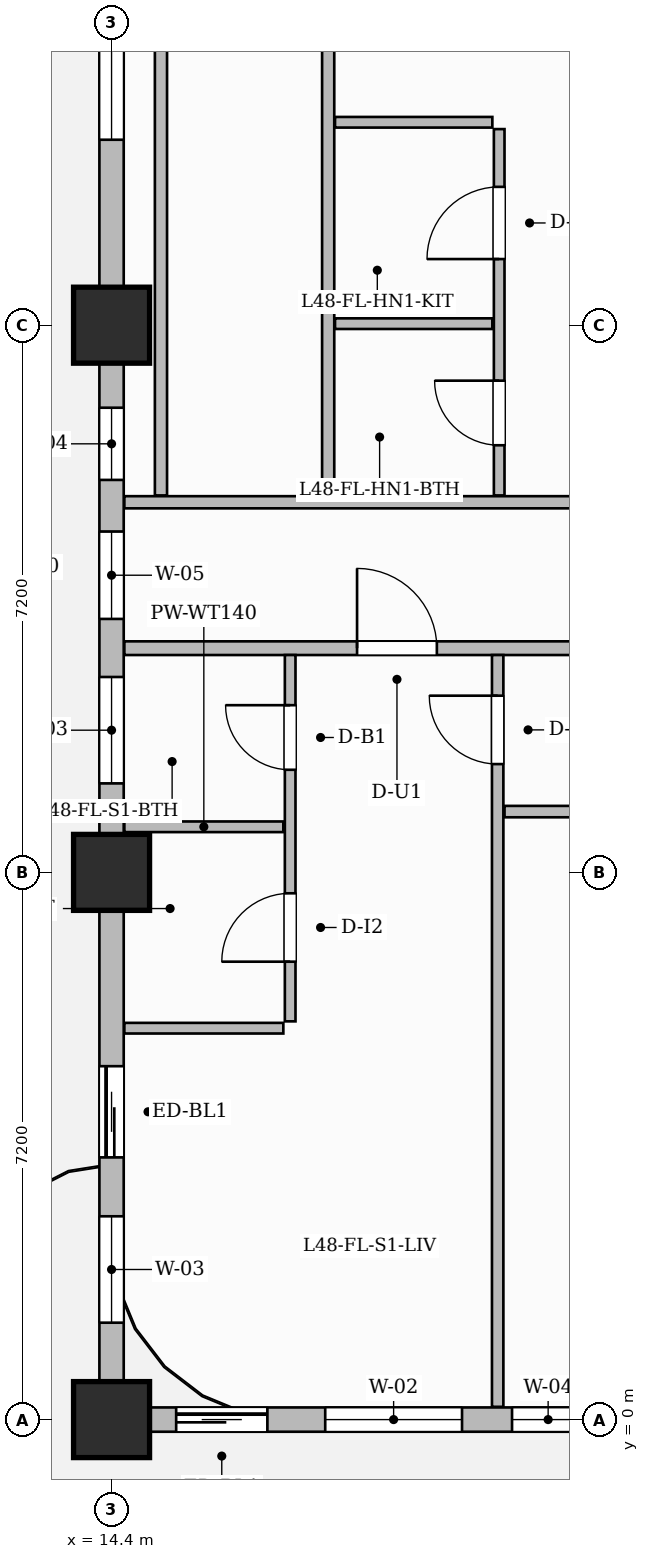
"""IFC4 building model, lengths in metres.
Left out: names, types, materials, properties, quantities, classifications, styles, units other than length and angle.
Written with IfcOpenShell. Run it as: python <this file> out.ifc"""

import sys

from ifc_helpers import new_model, si_unit, direction, frame, frame_2d, origin, origin_2d, place, context, subcontext, project, spatial, rectangle, extrude, source, transform, mapped, element, fill, save


model = new_model("IFC4")
c1 = context("Model", 3, precision=1e-05, world=origin(), true_north=direction((0.0, 1.0)))
c2 = subcontext(c1, "Body", "Model", "MODEL_VIEW")
j1 = project(units=[si_unit("LENGTHUNIT", "METRE"), si_unit("PLANEANGLEUNIT", "RADIAN")], contexts=[c1])
p1 = place(None, origin())
s1 = spatial("IfcSite", under=j1, at=p1, CompositionType="ELEMENT")
p2 = place(p1, origin())
s2 = spatial("IfcBuilding", under=s1, at=p2, CompositionType="ELEMENT")
p3 = place(p2, frame((0.0, 0.0, 192.65)))
s3 = spatial("IfcBuildingStorey", under=s2, at=p3, CompositionType="ELEMENT", Elevation=192.65)
m1 = source(origin(), c2, "Body", "SweptSolid", [
    extrude(rectangle(XDim=1.0, YDim=1.0, at=origin_2d()), origin(), (0.0, 0.0, 1.0), 3.85),
])
for number, where, z_axis, x_axis in (
    (1, (14.4, 0.0, 0.0), (0.0, 0.0, 1.0), (1.0, 0.0, 0.0)),
    (2, (14.4, 7.2, 0.0), (0.0, 0.0, 1.0), (1.0, 0.0, 0.0)),
    (3, (14.4, 14.4, 0.0), (0.0, 0.0, 1.0), (1.0, 0.0, 0.0)),
):
    element("IfcColumn", number, at=place(p3, frame(where, z_axis=z_axis, x_axis=x_axis)), inside=s3, PredefinedType="COLUMN", context=c2, shape_type="MappedRepresentation", body=[
        mapped(m1, transform((0.0, 0.0, 0.0), scale=1.0)),
    ])
p4 = place(p3, frame((14.568, 10.15, 0.0), z_axis=(0.0, 0.0, 1.0), x_axis=(1.0, 0.0, 0.0)))
e4 = element("IfcWall", 4, at=p4, inside=s3, PredefinedType="PARTITIONING", context=c2, shape_type="SweptSolid", body=[
    extrude(rectangle(XDim=15.542, YDim=0.18, at=frame_2d((7.771, 0.0))), origin(), (0.0, 0.0, 1.0), 3.55),
])
p5 = place(p4, frame((3.062, 0.0, 0.0)))
e5 = element("IfcOpeningElement", 5, at=p5, cuts=e4, PredefinedType="OPENING", context=c2, shape_type="SweptSolid", body=[
    extrude(rectangle(XDim=1.05, YDim=2.25, at=frame_2d((0.525, 1.125))), frame((0.0, 0.1, 0.0), z_axis=(0.0, -1.0, 0.0), x_axis=(1.0, 0.0, 0.0)), (0.0, 0.0, 1.0), 0.2),
])
p6 = place(p4, frame((12.632, 0.0, 0.0)))
e6 = element("IfcOpeningElement", 6, at=p6, cuts=e4, PredefinedType="OPENING", context=c2, shape_type="SweptSolid", body=[
    extrude(rectangle(XDim=1.4, YDim=2.35, at=frame_2d((0.7, 1.175))), frame((0.0, 0.1, 0.0), z_axis=(0.0, -1.0, 0.0), x_axis=(1.0, 0.0, 0.0)), (0.0, 0.0, 1.0), 0.2),
])
p7 = place(p3, frame((14.568, 12.07, 0.0), z_axis=(0.0, 0.0, 1.0), x_axis=(1.0, 0.0, 0.0)))
e7 = element("IfcWall", 7, at=p7, inside=s3, PredefinedType="PARTITIONING", context=c2, shape_type="SweptSolid", body=[
    extrude(rectangle(XDim=15.542, YDim=0.16, at=frame_2d((7.771, 0.0))), origin(), (0.0, 0.0, 1.0), 3.55),
])
p8 = place(p7, frame((6.557, 0.0, 0.0)))
e8 = element("IfcOpeningElement", 8, at=p8, cuts=e7, PredefinedType="OPENING", context=c2, shape_type="SweptSolid", body=[
    extrude(rectangle(XDim=1.05, YDim=2.25, at=frame_2d((0.525, 1.125))), frame((0.0, 0.09, 0.0), z_axis=(0.0, -1.0, 0.0), x_axis=(1.0, 0.0, 0.0)), (0.0, 0.0, 1.0), 0.18),
])
p9 = place(p3, frame((16.75, 5.24, 0.0), z_axis=(0.0, 0.0, 1.0), x_axis=(0.0, 1.0, 0.0)))
e9 = element("IfcWall", 9, at=p9, inside=s3, PredefinedType="PARTITIONING", context=c2, shape_type="SweptSolid", body=[
    extrude(rectangle(XDim=4.82, YDim=0.14, at=frame_2d((2.41, 0.0))), origin(), (0.0, 0.0, 1.0), 3.55),
])
p10 = place(p9, frame((0.785, 0.0, 0.0)))
e10 = element("IfcOpeningElement", 10, at=p10, cuts=e9, PredefinedType="OPENING", context=c2, shape_type="SweptSolid", body=[
    extrude(rectangle(XDim=0.9, YDim=2.15, at=frame_2d((0.45, 1.075))), frame((0.0, 0.08, 0.0), z_axis=(0.0, -1.0, 0.0), x_axis=(1.0, 0.0, 0.0)), (0.0, 0.0, 1.0), 0.16),
])
p11 = place(p9, frame((3.31, 0.0, 0.0)))
e11 = element("IfcOpeningElement", 11, at=p11, cuts=e9, PredefinedType="OPENING", context=c2, shape_type="SweptSolid", body=[
    extrude(rectangle(XDim=0.85, YDim=2.1, at=frame_2d((0.425, 1.05))), frame((0.0, 0.08, 0.0), z_axis=(0.0, -1.0, 0.0), x_axis=(1.0, 0.0, 0.0)), (0.0, 0.0, 1.0), 0.16),
])
for number, where, z_axis, x_axis in (
    (12, (14.568, 7.8, 0.0), (0.0, 0.0, 1.0), (1.0, 0.0, 0.0)),
    (13, (14.568, 5.15, 0.0), (0.0, 0.0, 1.0), (1.0, 0.0, 0.0)),
):
    element("IfcWall", number, at=place(p3, frame(where, z_axis=z_axis, x_axis=x_axis)), inside=s3, PredefinedType="PARTITIONING", context=c2, shape_type="SweptSolid", body=[
        extrude(rectangle(XDim=2.092, YDim=0.14, at=frame_2d((1.046, 0.0))), origin(), (0.0, 0.0, 1.0), 3.55),
    ])
p12 = place(p3, frame((19.48, 0.168, 0.0), z_axis=(0.0, 0.0, 1.0), x_axis=(0.0, 1.0, 0.0)))
e14 = element("IfcWall", 14, at=p12, inside=s3, PredefinedType="PARTITIONING", context=c2, shape_type="SweptSolid", body=[
    extrude(rectangle(XDim=9.892, YDim=0.15, at=frame_2d((4.946, 0.0))), origin(), (0.0, 0.0, 1.0), 3.55),
])
p13 = place(p12, frame((8.457, 0.0, 0.0)))
e15 = element("IfcOpeningElement", 15, at=p13, cuts=e14, PredefinedType="OPENING", context=c2, shape_type="SweptSolid", body=[
    extrude(rectangle(XDim=0.9, YDim=2.15, at=frame_2d((0.45, 1.075))), frame((0.0, 0.085, 0.0), z_axis=(0.0, -1.0, 0.0), x_axis=(1.0, 0.0, 0.0)), (0.0, 0.0, 1.0), 0.17),
])
p14 = place(p3, frame((19.57, 8.0, 0.0), z_axis=(0.0, 0.0, 1.0), x_axis=(1.0, 0.0, 0.0)))
e16 = element("IfcWall", 16, at=p14, inside=s3, PredefinedType="PARTITIONING", context=c2, shape_type="SweptSolid", body=[
    extrude(rectangle(XDim=5.94, YDim=0.15, at=frame_2d((2.97, 0.0))), origin(), (0.0, 0.0, 1.0), 3.55),
])
p15 = place(p14, frame((2.659, 0.0, 0.0)))
e17 = element("IfcOpeningElement", 17, at=p15, cuts=e16, PredefinedType="OPENING", context=c2, shape_type="SweptSolid", body=[
    extrude(rectangle(XDim=0.9, YDim=2.15, at=frame_2d((0.45, 1.075))), frame((0.0, 0.085, 0.0), z_axis=(0.0, -1.0, 0.0), x_axis=(1.0, 0.0, 0.0)), (0.0, 0.0, 1.0), 0.17),
])
for number, where, z_axis, x_axis in (
    (18, (15.05, 12.16, 0.0), (0.0, 0.0, 1.0), (0.0, 1.0, 0.0)),
    (19, (17.25, 12.16, 0.0), (0.0, 0.0, 1.0), (0.0, 1.0, 0.0)),
):
    element("IfcWall", number, at=place(p3, frame(where, z_axis=z_axis, x_axis=x_axis)), inside=s3, PredefinedType="PARTITIONING", context=c2, shape_type="SweptSolid", body=[
        extrude(rectangle(XDim=12.95, YDim=0.16, at=frame_2d((6.475, 0.0))), origin(), (0.0, 0.0, 1.0), 3.55),
    ])
p16 = place(p3, frame((19.5, 12.16, 0.0), z_axis=(0.0, 0.0, 1.0), x_axis=(0.0, 1.0, 0.0)))
e20 = element("IfcWall", 20, at=p16, inside=s3, PredefinedType="PARTITIONING", context=c2, shape_type="SweptSolid", body=[
    extrude(rectangle(XDim=4.82, YDim=0.14, at=frame_2d((2.41, 0.0))), origin(), (0.0, 0.0, 1.0), 3.55),
])
p17 = place(p16, frame((0.66, 0.0, 0.0)))
e21 = element("IfcOpeningElement", 21, at=p17, cuts=e20, PredefinedType="OPENING", context=c2, shape_type="SweptSolid", body=[
    extrude(rectangle(XDim=0.85, YDim=2.1, at=frame_2d((0.425, 1.05))), frame((0.0, 0.08, 0.0), z_axis=(0.0, -1.0, 0.0), x_axis=(1.0, 0.0, 0.0)), (0.0, 0.0, 1.0), 0.16),
])
p18 = place(p16, frame((3.11, 0.0, 0.0)))
e22 = element("IfcOpeningElement", 22, at=p18, cuts=e20, PredefinedType="OPENING", context=c2, shape_type="SweptSolid", body=[
    extrude(rectangle(XDim=0.95, YDim=2.15, at=frame_2d((0.475, 1.075))), frame((0.0, 0.08, 0.0), z_axis=(0.0, -1.0, 0.0), x_axis=(1.0, 0.0, 0.0)), (0.0, 0.0, 1.0), 0.16),
])
p19 = place(p3, frame((17.34, 14.42, 0.0), z_axis=(0.0, 0.0, 1.0), x_axis=(1.0, 0.0, 0.0)))
e23 = element("IfcWall", 23, at=p19, inside=s3, PredefinedType="PARTITIONING", context=c2, shape_type="SweptSolid", body=[
    extrude(rectangle(XDim=2.07, YDim=0.14, at=frame_2d((1.035, 0.0))), origin(), (0.0, 0.0, 1.0), 3.035),
])
p20 = place(p3, frame((17.34, 17.07, 0.0), z_axis=(0.0, 0.0, 1.0), x_axis=(1.0, 0.0, 0.0)))
e24 = element("IfcWall", 24, at=p20, inside=s3, PredefinedType="PARTITIONING", context=c2, shape_type="SweptSolid", body=[
    extrude(rectangle(XDim=2.07, YDim=0.14, at=frame_2d((1.035, 0.0))), origin(), (0.0, 0.0, 1.0), 3.55),
])
p21 = place(p3, frame((14.4, 0.0, 0.0), z_axis=(0.0, 0.0, 1.0), x_axis=(1.0, 0.0, 0.0)))
e25 = element("IfcWall", 25, at=p21, inside=s3, PredefinedType="SOLIDWALL", context=c2, shape_type="SweptSolid", body=[
    extrude(rectangle(XDim=35.4, YDim=0.32, at=frame_2d((17.7, 0.0))), origin(), (0.0, 0.0, 1.0), 3.035),
])
p22 = place(p21, frame((0.85, 0.0, 0.0)))
e26 = element("IfcOpeningElement", 26, at=p22, cuts=e25, PredefinedType="OPENING", context=c2, shape_type="SweptSolid", body=[
    extrude(rectangle(XDim=1.2, YDim=2.2, at=frame_2d((0.6, 1.1))), frame((0.0, 0.17, 0.0), z_axis=(0.0, -1.0, 0.0), x_axis=(1.0, 0.0, 0.0)), (0.0, 0.0, 1.0), 0.34),
])
p23 = place(p21, frame((2.811, 0.0, 0.8)))
e27 = element("IfcOpeningElement", 27, at=p23, cuts=e25, PredefinedType="OPENING", context=c2, shape_type="SweptSolid", body=[
    extrude(rectangle(XDim=1.8, YDim=1.85, at=frame_2d((0.9, 0.925))), frame((0.0, 0.17, 0.0), z_axis=(0.0, -1.0, 0.0), x_axis=(1.0, 0.0, 0.0)), (0.0, 0.0, 1.0), 0.34),
])
p24 = place(p21, frame((5.269, 0.0, 0.8)))
e28 = element("IfcOpeningElement", 28, at=p24, cuts=e25, PredefinedType="OPENING", context=c2, shape_type="SweptSolid", body=[
    extrude(rectangle(XDim=0.95, YDim=1.75, at=frame_2d((0.475, 0.875))), frame((0.0, 0.17, 0.0), z_axis=(0.0, -1.0, 0.0), x_axis=(1.0, 0.0, 0.0)), (0.0, 0.0, 1.0), 0.34),
])
p25 = place(p21, frame((8.696, 0.0, 0.8)))
e29 = element("IfcOpeningElement", 29, at=p25, cuts=e25, PredefinedType="OPENING", context=c2, shape_type="SweptSolid", body=[
    extrude(rectangle(XDim=1.8, YDim=1.85, at=frame_2d((0.9, 0.925))), frame((0.0, 0.17, 0.0), z_axis=(0.0, -1.0, 0.0), x_axis=(1.0, 0.0, 0.0)), (0.0, 0.0, 1.0), 0.34),
])
p26 = place(p21, frame((11.704, 0.0, 0.8)))
e30 = element("IfcOpeningElement", 30, at=p26, cuts=e25, PredefinedType="OPENING", context=c2, shape_type="SweptSolid", body=[
    extrude(rectangle(XDim=1.4, YDim=1.85, at=frame_2d((0.7, 0.925))), frame((0.0, 0.17, 0.0), z_axis=(0.0, -1.0, 0.0), x_axis=(1.0, 0.0, 0.0)), (0.0, 0.0, 1.0), 0.34),
])
p27 = place(p21, frame((16.804, 0.0, 0.8)))
e31 = element("IfcOpeningElement", 31, at=p27, cuts=e25, PredefinedType="OPENING", context=c2, shape_type="SweptSolid", body=[
    extrude(rectangle(XDim=1.8, YDim=1.85, at=frame_2d((0.9, 0.925))), frame((0.0, 0.17, 0.0), z_axis=(0.0, -1.0, 0.0), x_axis=(1.0, 0.0, 0.0)), (0.0, 0.0, 1.0), 0.34),
])
p28 = place(p21, frame((21.725, 0.0, 0.8)))
e32 = element("IfcOpeningElement", 32, at=p28, cuts=e25, PredefinedType="OPENING", context=c2, shape_type="SweptSolid", body=[
    extrude(rectangle(XDim=1.8, YDim=1.85, at=frame_2d((0.9, 0.925))), frame((0.0, 0.17, 0.0), z_axis=(0.0, -1.0, 0.0), x_axis=(1.0, 0.0, 0.0)), (0.0, 0.0, 1.0), 0.34),
])
p29 = place(p21, frame((24.475, 0.0, 0.8)))
e33 = element("IfcOpeningElement", 33, at=p29, cuts=e25, PredefinedType="OPENING", context=c2, shape_type="SweptSolid", body=[
    extrude(rectangle(XDim=1.8, YDim=1.85, at=frame_2d((0.9, 0.925))), frame((0.0, 0.17, 0.0), z_axis=(0.0, -1.0, 0.0), x_axis=(1.0, 0.0, 0.0)), (0.0, 0.0, 1.0), 0.34),
])
p30 = place(p21, frame((29.075, 0.0, 0.8)))
e34 = element("IfcOpeningElement", 34, at=p30, cuts=e25, PredefinedType="OPENING", context=c2, shape_type="SweptSolid", body=[
    extrude(rectangle(XDim=1.8, YDim=1.85, at=frame_2d((0.9, 0.925))), frame((0.0, 0.17, 0.0), z_axis=(0.0, -1.0, 0.0), x_axis=(1.0, 0.0, 0.0)), (0.0, 0.0, 1.0), 0.34),
])
p31 = place(p21, frame((32.125, 0.0, 0.8)))
e35 = element("IfcOpeningElement", 35, at=p31, cuts=e25, PredefinedType="OPENING", context=c2, shape_type="SweptSolid", body=[
    extrude(rectangle(XDim=1.8, YDim=1.85, at=frame_2d((0.9, 0.925))), frame((0.0, 0.17, 0.0), z_axis=(0.0, -1.0, 0.0), x_axis=(1.0, 0.0, 0.0)), (0.0, 0.0, 1.0), 0.34),
])
p32 = place(p3, frame((14.4, 0.05, 0.0), z_axis=(0.0, 0.0, 1.0), x_axis=(0.0, 1.0, 0.0)))
e36 = element("IfcWall", 36, at=p32, inside=s3, PredefinedType="SOLIDWALL", context=c2, shape_type="SweptSolid", body=[
    extrude(rectangle(XDim=20.6, YDim=0.32, at=frame_2d((10.3, 0.0))), origin(), (0.0, 0.0, 1.0), 3.035),
])
p33 = place(p32, frame((3.4, 0.0, 0.0)))
e37 = element("IfcOpeningElement", 37, at=p33, cuts=e36, PredefinedType="OPENING", context=c2, shape_type="SweptSolid", body=[
    extrude(rectangle(XDim=1.2, YDim=2.2, at=frame_2d((0.6, 1.1))), frame((0.0, 0.17, 0.0), z_axis=(0.0, -1.0, 0.0), x_axis=(1.0, 0.0, 0.0)), (0.0, 0.0, 1.0), 0.34),
])
p34 = place(p32, frame((1.225, 0.0, 0.8)))
e38 = element("IfcOpeningElement", 38, at=p34, cuts=e36, PredefinedType="OPENING", context=c2, shape_type="SweptSolid", body=[
    extrude(rectangle(XDim=1.4, YDim=1.85, at=frame_2d((0.7, 0.925))), frame((0.0, 0.17, 0.0), z_axis=(0.0, -1.0, 0.0), x_axis=(1.0, 0.0, 0.0)), (0.0, 0.0, 1.0), 0.34),
])
p35 = place(p32, frame((8.321, 0.0, 0.8)))
e39 = element("IfcOpeningElement", 39, at=p35, cuts=e36, PredefinedType="OPENING", context=c2, shape_type="SweptSolid", body=[
    extrude(rectangle(XDim=1.4, YDim=1.85, at=frame_2d((0.7, 0.925))), frame((0.0, 0.17, 0.0), z_axis=(0.0, -1.0, 0.0), x_axis=(1.0, 0.0, 0.0)), (0.0, 0.0, 1.0), 0.34),
])
p36 = place(p32, frame((10.485, 0.0, 0.8)))
e40 = element("IfcOpeningElement", 40, at=p36, cuts=e36, PredefinedType="OPENING", context=c2, shape_type="SweptSolid", body=[
    extrude(rectangle(XDim=1.15, YDim=1.8, at=frame_2d((0.575, 0.9))), frame((0.0, 0.17, 0.0), z_axis=(0.0, -1.0, 0.0), x_axis=(1.0, 0.0, 0.0)), (0.0, 0.0, 1.0), 0.34),
])
p37 = place(p32, frame((12.314, 0.0, 0.8)))
e41 = element("IfcOpeningElement", 41, at=p37, cuts=e36, PredefinedType="OPENING", context=c2, shape_type="SweptSolid", body=[
    extrude(rectangle(XDim=0.95, YDim=1.75, at=frame_2d((0.475, 0.875))), frame((0.0, 0.17, 0.0), z_axis=(0.0, -1.0, 0.0), x_axis=(1.0, 0.0, 0.0)), (0.0, 0.0, 1.0), 0.34),
])
p38 = place(p32, frame((16.79, 0.0, 0.8)))
e42 = element("IfcOpeningElement", 42, at=p38, cuts=e36, PredefinedType="OPENING", context=c2, shape_type="SweptSolid", body=[
    extrude(rectangle(XDim=1.8, YDim=1.85, at=frame_2d((0.9, 0.925))), frame((0.0, 0.17, 0.0), z_axis=(0.0, -1.0, 0.0), x_axis=(1.0, 0.0, 0.0)), (0.0, 0.0, 1.0), 0.34),
])
m2 = source(origin(), c2, "Body", "SweptSolid", [
    extrude(rectangle(XDim=0.9, YDim=2.15, at=frame_2d((0.45, 1.075))), frame((0.0, 0.025, 0.0), z_axis=(0.0, -1.0, 0.0), x_axis=(1.0, 0.0, 0.0)), (0.0, 0.0, 1.0), 0.05),
])
p39 = place(p10, origin())
e43 = element("IfcDoor", 43, at=p39, inside=s3, OperationType="SINGLE_SWING_LEFT", PredefinedType="DOOR", context=c2, shape_type="MappedRepresentation", body=[
    mapped(m2, transform((0.0, 0.0, 0.0), scale=1.0)),
])
fill(e10, e43)
m3 = source(origin(), c2, "Body", "SweptSolid", [
    extrude(rectangle(XDim=0.85, YDim=2.1, at=frame_2d((0.425, 1.05))), frame((0.0, 0.025, 0.0), z_axis=(0.0, -1.0, 0.0), x_axis=(1.0, 0.0, 0.0)), (0.0, 0.0, 1.0), 0.05),
])
p40 = place(p11, origin())
e44 = element("IfcDoor", 44, at=p40, inside=s3, OperationType="SINGLE_SWING_RIGHT", PredefinedType="DOOR", context=c2, shape_type="MappedRepresentation", body=[
    mapped(m3, transform((0.0, 0.0, 0.0), scale=1.0)),
])
fill(e11, e44)
m4 = source(origin(), c2, "Body", "SweptSolid", [
    extrude(rectangle(XDim=1.05, YDim=2.25, at=frame_2d((0.525, 1.125))), frame((0.0, 0.025, 0.0), z_axis=(0.0, -1.0, 0.0), x_axis=(1.0, 0.0, 0.0)), (0.0, 0.0, 1.0), 0.05),
])
p41 = place(p5, origin())
e45 = element("IfcDoor", 45, at=p41, inside=s3, OperationType="SINGLE_SWING_LEFT", PredefinedType="DOOR", context=c2, shape_type="MappedRepresentation", body=[
    mapped(m4, transform((0.0, 0.0, 0.0), scale=1.0)),
])
fill(e5, e45)
p42 = place(p13, origin())
e46 = element("IfcDoor", 46, at=p42, inside=s3, OperationType="SINGLE_SWING_RIGHT", PredefinedType="DOOR", context=c2, shape_type="MappedRepresentation", body=[
    mapped(m2, transform((0.0, 0.0, 0.0), scale=1.0)),
])
fill(e15, e46)
p43 = place(p17, origin())
e47 = element("IfcDoor", 47, at=p43, inside=s3, OperationType="SINGLE_SWING_RIGHT", PredefinedType="DOOR", context=c2, shape_type="MappedRepresentation", body=[
    mapped(m3, transform((0.0, 0.0, 0.0), scale=1.0)),
])
fill(e21, e47)
m5 = source(origin(), c2, "Body", "SweptSolid", [
    extrude(rectangle(XDim=0.95, YDim=2.15, at=frame_2d((0.475, 1.075))), frame((0.0, 0.025, 0.0), z_axis=(0.0, -1.0, 0.0), x_axis=(1.0, 0.0, 0.0)), (0.0, 0.0, 1.0), 0.05),
])
p44 = place(p18, origin())
e48 = element("IfcDoor", 48, at=p44, inside=s3, OperationType="SINGLE_SWING_LEFT", PredefinedType="DOOR", context=c2, shape_type="MappedRepresentation", body=[
    mapped(m5, transform((0.0, 0.0, 0.0), scale=1.0)),
])
fill(e22, e48)
m6 = source(origin(), c2, "Body", "SweptSolid", [
    extrude(rectangle(XDim=1.2, YDim=2.2, at=frame_2d((0.6, 1.1))), frame((0.0, 0.025, 0.0), z_axis=(0.0, -1.0, 0.0), x_axis=(1.0, 0.0, 0.0)), (0.0, 0.0, 1.0), 0.05),
])
p45 = place(p22, origin())
e49 = element("IfcDoor", 49, at=p45, inside=s3, OperationType="SLIDING_TO_LEFT", PredefinedType="DOOR", context=c2, shape_type="MappedRepresentation", body=[
    mapped(m6, transform((0.0, 0.0, 0.0), scale=1.0)),
])
fill(e26, e49)
p46 = place(p33, origin())
e50 = element("IfcDoor", 50, at=p46, inside=s3, OperationType="SLIDING_TO_LEFT", PredefinedType="DOOR", context=c2, shape_type="MappedRepresentation", body=[
    mapped(m6, transform((0.0, 0.0, 0.0), scale=1.0)),
])
fill(e37, e50)
m7 = source(origin(), c2, "Body", "SweptSolid", [
    extrude(rectangle(XDim=1.8, YDim=1.85, at=frame_2d((0.9, 0.925))), frame((0.0, 0.03, 0.0), z_axis=(0.0, -1.0, 0.0), x_axis=(1.0, 0.0, 0.0)), (0.0, 0.0, 1.0), 0.06),
])
p47 = place(p23, origin())
e51 = element("IfcWindow", 51, at=p47, inside=s3, PartitioningType="DOUBLE_PANEL_VERTICAL", PredefinedType="WINDOW", context=c2, shape_type="MappedRepresentation", body=[
    mapped(m7, transform((0.0, 0.0, 0.0), scale=1.0)),
])
fill(e27, e51)
m8 = source(origin(), c2, "Body", "SweptSolid", [
    extrude(rectangle(XDim=0.95, YDim=1.75, at=frame_2d((0.475, 0.875))), frame((0.0, 0.03, 0.0), z_axis=(0.0, -1.0, 0.0), x_axis=(1.0, 0.0, 0.0)), (0.0, 0.0, 1.0), 0.06),
])
p48 = place(p24, origin())
e52 = element("IfcWindow", 52, at=p48, inside=s3, PartitioningType="SINGLE_PANEL", PredefinedType="WINDOW", context=c2, shape_type="MappedRepresentation", body=[
    mapped(m8, transform((0.0, 0.0, 0.0), scale=1.0)),
])
fill(e28, e52)
m9 = source(origin(), c2, "Body", "SweptSolid", [
    extrude(rectangle(XDim=1.4, YDim=1.85, at=frame_2d((0.7, 0.925))), frame((0.0, 0.03, 0.0), z_axis=(0.0, -1.0, 0.0), x_axis=(1.0, 0.0, 0.0)), (0.0, 0.0, 1.0), 0.06),
])
p49 = place(p34, origin())
e53 = element("IfcWindow", 53, at=p49, inside=s3, PartitioningType="SINGLE_PANEL", PredefinedType="WINDOW", context=c2, shape_type="MappedRepresentation", body=[
    mapped(m9, transform((0.0, 0.0, 0.0), scale=1.0)),
])
fill(e38, e53)
p50 = place(p35, origin())
e54 = element("IfcWindow", 54, at=p50, inside=s3, PartitioningType="SINGLE_PANEL", PredefinedType="WINDOW", context=c2, shape_type="MappedRepresentation", body=[
    mapped(m9, transform((0.0, 0.0, 0.0), scale=1.0)),
])
fill(e39, e54)
m10 = source(origin(), c2, "Body", "SweptSolid", [
    extrude(rectangle(XDim=1.15, YDim=1.8, at=frame_2d((0.575, 0.9))), frame((0.0, 0.03, 0.0), z_axis=(0.0, -1.0, 0.0), x_axis=(1.0, 0.0, 0.0)), (0.0, 0.0, 1.0), 0.06),
])
p51 = place(p36, origin())
e55 = element("IfcWindow", 55, at=p51, inside=s3, PartitioningType="SINGLE_PANEL", PredefinedType="WINDOW", context=c2, shape_type="MappedRepresentation", body=[
    mapped(m10, transform((0.0, 0.0, 0.0), scale=1.0)),
])
fill(e40, e55)
p52 = place(p37, origin())
e56 = element("IfcWindow", 56, at=p52, inside=s3, PartitioningType="SINGLE_PANEL", PredefinedType="WINDOW", context=c2, shape_type="MappedRepresentation", body=[
    mapped(m8, transform((0.0, 0.0, 0.0), scale=1.0)),
])
fill(e41, e56)
p53 = place(p38, origin())
e57 = element("IfcWindow", 57, at=p53, inside=s3, PartitioningType="DOUBLE_PANEL_VERTICAL", PredefinedType="WINDOW", context=c2, shape_type="MappedRepresentation", body=[
    mapped(m7, transform((0.0, 0.0, 0.0), scale=1.0)),
])
fill(e42, e57)
save(model, sys.argv[1])
